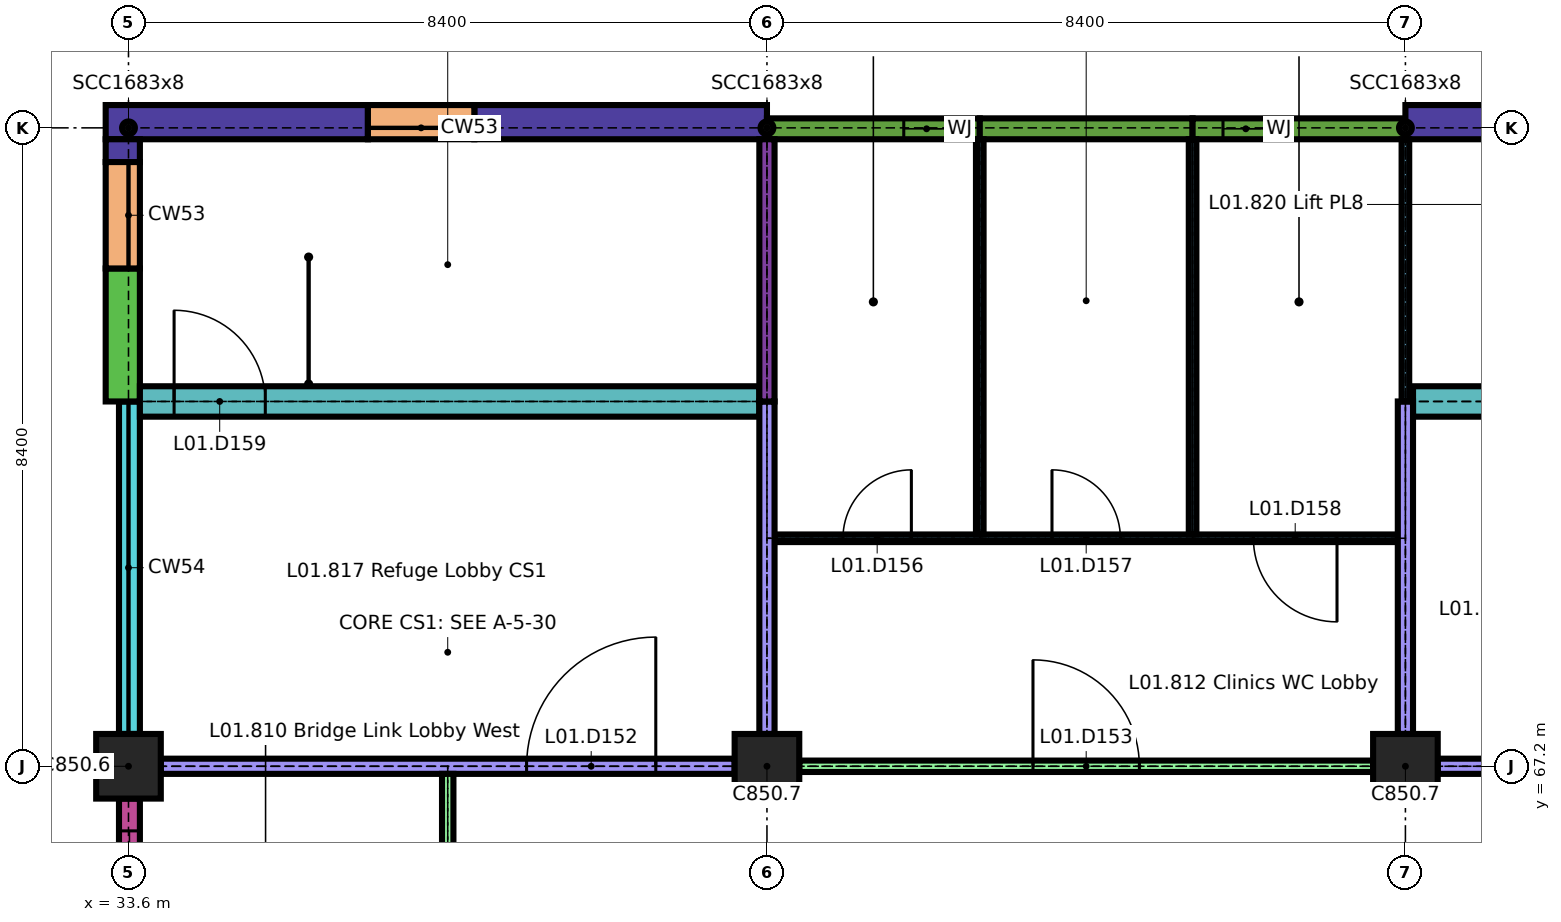
"""IFC4 building model, lengths in metres.
Left out: names, types, materials, properties, quantities, classifications, styles, units other than length and angle.
Written with IfcOpenShell. Run it as: python <this file> out.ifc"""

import sys

from ifc_helpers import new_model, si_unit, direction, frame, frame_2d, origin, origin_2d, place, context, subcontext, project, spatial, rectangle, hollow_circle, extrude, element, fill, save


model = new_model("IFC4")
c1 = context("Model", 3, precision=1e-05, world=origin(), true_north=direction((0.0, 1.0)))
c2 = subcontext(c1, "Body", "Model", "MODEL_VIEW")
j1 = project(units=[si_unit("LENGTHUNIT", "METRE"), si_unit("PLANEANGLEUNIT", "RADIAN")], contexts=[c1])
p1 = place(None, origin())
s1 = spatial("IfcSite", under=j1, at=p1, CompositionType="ELEMENT")
p2 = place(p1, origin())
s2 = spatial("IfcBuilding", under=s1, at=p2, CompositionType="ELEMENT")
p3 = place(p2, frame((0.0, 0.0, 4.5)))
s3 = spatial("IfcBuildingStorey", under=s2, at=p3, CompositionType="ELEMENT", Elevation=4.5)
for number, where, z_axis, x_axis in (
    (1, (33.6, 67.2, 0.0), (0.0, 0.0, 1.0), (1.0, 0.0, 0.0)),
    (2, (42.0, 67.2, 0.0), (0.0, 0.0, 1.0), (1.0, 0.0, 0.0)),
    (3, (50.4, 67.2, 0.0), (0.0, 0.0, 1.0), (1.0, 0.0, 0.0)),
):
    element("IfcColumn", number, at=place(p3, frame(where, z_axis=z_axis, x_axis=x_axis)), inside=s3, PredefinedType="COLUMN", context=c2, shape_type="SweptSolid", body=[
        extrude(rectangle(XDim=0.85, YDim=0.85, at=origin_2d()), origin(), (0.0, 0.0, 1.0), 3.3),
    ])
for number, where, z_axis, x_axis in (
    (4, (33.6, 75.6, 3.3), (0.0, 0.0, 1.0), (1.0, 0.0, 0.0)),
    (5, (42.0, 75.6, 3.3), (0.0, 0.0, 1.0), (1.0, 0.0, 0.0)),
    (6, (50.4, 75.6, 3.3), (0.0, 0.0, 1.0), (1.0, 0.0, 0.0)),
):
    element("IfcColumn", number, at=place(p3, frame(where, z_axis=z_axis, x_axis=x_axis)), inside=s3, PredefinedType="COLUMN", context=c2, shape_type="SweptSolid", body=[
        extrude(hollow_circle(Radius=0.084, WallThickness=0.008, at=origin_2d()), origin(), (0.0, 0.0, 1.0), 1.058),
    ])
p4 = place(p3, frame((33.3, 75.675, 0.0), z_axis=(0.0, 0.0, 1.0), x_axis=(1.0, 0.0, 0.0)))
e7 = element("IfcWall", 7, at=p4, inside=s3, PredefinedType="SOLIDWALL", context=c2, shape_type="SweptSolid", body=[
    extrude(rectangle(XDim=3.45, YDim=0.45, at=frame_2d((1.725, 0.0))), origin(), (0.0, 0.0, 1.0), 3.3),
])
p5 = place(p3, frame((38.15, 75.675, 0.0), z_axis=(0.0, 0.0, 1.0), x_axis=(1.0, 0.0, 0.0)))
e8 = element("IfcWall", 8, at=p5, inside=s3, PredefinedType="SOLIDWALL", context=c2, shape_type="SweptSolid", body=[
    extrude(rectangle(XDim=3.85, YDim=0.45, at=frame_2d((1.925, 0.0))), origin(), (0.0, 0.0, 1.0), 3.3),
])
p6 = place(p3, frame((36.75, 75.675, 0.0), z_axis=(0.0, 0.0, 1.0), x_axis=(1.0, 0.0, 0.0)))
e9 = element("IfcWall", 9, at=p6, inside=s3, PredefinedType="SOLIDWALL", context=c2, shape_type="SweptSolid", body=[
    extrude(rectangle(XDim=1.4, YDim=0.45, at=frame_2d((0.7, 0.0))), origin(), (0.0, 0.0, 1.0), 0.6),
])
p7 = place(p3, frame((42.0, 75.587, 0.0), z_axis=(0.0, 0.0, 1.0), x_axis=(1.0, 0.0, 0.0)))
e10 = element("IfcWall", 10, at=p7, inside=s3, PredefinedType="SOLIDWALL", context=c2, shape_type="SweptSolid", body=[
    extrude(rectangle(XDim=2.8, YDim=0.275, at=frame_2d((1.4, 0.0))), origin(), (0.0, 0.0, 1.0), 3.3),
])
p8 = place(p7, frame((1.8, 0.0, 1.5)))
e11 = element("IfcOpeningElement", 11, at=p8, cuts=e10, PredefinedType="OPENING", context=c2, shape_type="SweptSolid", body=[
    extrude(rectangle(XDim=0.6, YDim=0.6, at=frame_2d((0.3, 0.3))), frame((0.0, 0.147, 0.0), z_axis=(0.0, -1.0, 0.0), x_axis=(1.0, 0.0, 0.0)), (0.0, 0.0, 1.0), 0.295),
])
p9 = place(p3, frame((44.8, 75.587, 0.0), z_axis=(0.0, 0.0, 1.0), x_axis=(1.0, 0.0, 0.0)))
e12 = element("IfcWall", 12, at=p9, inside=s3, PredefinedType="SOLIDWALL", context=c2, shape_type="SweptSolid", body=[
    extrude(rectangle(XDim=2.8, YDim=0.275, at=frame_2d((1.4, 0.0))), origin(), (0.0, 0.0, 1.0), 3.3),
])
p10 = place(p3, frame((47.6, 75.587, 0.0), z_axis=(0.0, 0.0, 1.0), x_axis=(1.0, 0.0, 0.0)))
e13 = element("IfcWall", 13, at=p10, inside=s3, PredefinedType="SOLIDWALL", context=c2, shape_type="SweptSolid", body=[
    extrude(rectangle(XDim=2.8, YDim=0.275, at=frame_2d((1.4, 0.0))), origin(), (0.0, 0.0, 1.0), 3.3),
])
p11 = place(p10, frame((0.4, 0.0, 1.5)))
e14 = element("IfcOpeningElement", 14, at=p11, cuts=e13, PredefinedType="OPENING", context=c2, shape_type="SweptSolid", body=[
    extrude(rectangle(XDim=0.6, YDim=0.6, at=frame_2d((0.3, 0.3))), frame((0.0, 0.147, 0.0), z_axis=(0.0, -1.0, 0.0), x_axis=(1.0, 0.0, 0.0)), (0.0, 0.0, 1.0), 0.295),
])
p12 = place(p3, frame((50.4, 75.675, 0.0), z_axis=(0.0, 0.0, 1.0), x_axis=(1.0, 0.0, 0.0)))
e15 = element("IfcWall", 15, at=p12, inside=s3, PredefinedType="SOLIDWALL", context=c2, shape_type="SweptSolid", body=[
    extrude(rectangle(XDim=4.2, YDim=0.45, at=frame_2d((2.1, 0.0))), origin(), (0.0, 0.0, 1.0), 3.3),
])
p13 = place(p3, frame((33.613, 64.55, 0.0), z_axis=(0.0, 0.0, 1.0), x_axis=(0.0, 1.0, 0.0)))
e16 = element("IfcWall", 16, at=p13, inside=s3, PredefinedType="SOLIDWALL", context=c2, shape_type="SweptSolid", body=[
    extrude(rectangle(XDim=2.225, YDim=0.275, at=frame_2d((1.112, 0.0))), origin(), (0.0, 0.0, 1.0), 5.0),
])
p14 = place(p13, frame((0.6, 0.0, 0.9)))
e17 = element("IfcOpeningElement", 17, at=p14, cuts=e16, PredefinedType="OPENING", context=c2, shape_type="SweptSolid", body=[
    extrude(rectangle(XDim=1.2, YDim=1.5, at=frame_2d((0.6, 0.75))), frame((0.0, 0.147, 0.0), z_axis=(0.0, -1.0, 0.0), x_axis=(1.0, 0.0, 0.0)), (0.0, 0.0, 1.0), 0.295),
])
p15 = place(p3, frame((33.613, 67.625, 0.0), z_axis=(0.0, 0.0, 1.0), x_axis=(0.0, 1.0, 0.0)))
e18 = element("IfcWall", 18, at=p15, inside=s3, PredefinedType="SOLIDWALL", context=c2, shape_type="SweptSolid", body=[
    extrude(rectangle(XDim=4.375, YDim=0.275, at=frame_2d((2.188, 0.0))), origin(), (0.0, 0.0, 1.0), 0.6),
])
p16 = place(p3, frame((33.525, 72.0, 0.0), z_axis=(0.0, 0.0, 1.0), x_axis=(0.0, 1.0, 0.0)))
e19 = element("IfcWall", 19, at=p16, inside=s3, PredefinedType="SOLIDWALL", context=c2, shape_type="SweptSolid", body=[
    extrude(rectangle(XDim=1.75, YDim=0.45, at=frame_2d((0.875, 0.0))), origin(), (0.0, 0.0, 1.0), 5.0),
])
p17 = place(p3, frame((33.525, 75.15, 0.0), z_axis=(0.0, 0.0, 1.0), x_axis=(0.0, 1.0, 0.0)))
e20 = element("IfcWall", 20, at=p17, inside=s3, PredefinedType="SOLIDWALL", context=c2, shape_type="SweptSolid", body=[
    extrude(rectangle(XDim=0.3, YDim=0.45, at=frame_2d((0.15, 0.0))), origin(), (0.0, 0.0, 1.0), 3.3),
])
p18 = place(p3, frame((33.525, 73.75, 0.0), z_axis=(0.0, 0.0, 1.0), x_axis=(0.0, 1.0, 0.0)))
e21 = element("IfcWall", 21, at=p18, inside=s3, PredefinedType="SOLIDWALL", context=c2, shape_type="SweptSolid", body=[
    extrude(rectangle(XDim=1.4, YDim=0.45, at=frame_2d((0.7, 0.0))), origin(), (0.0, 0.0, 1.0), 0.6),
])
p19 = place(p3, frame((34.025, 67.2, 0.0), z_axis=(0.0, 0.0, 1.0), x_axis=(1.0, 0.0, 0.0)))
e22 = element("IfcWall", 22, at=p19, inside=s3, PredefinedType="PARTITIONING", context=c2, shape_type="SweptSolid", body=[
    extrude(rectangle(XDim=7.55, YDim=0.2, at=frame_2d((3.775, 0.0))), origin(), (0.0, 0.0, 1.0), 3.3),
])
p20 = place(p19, frame((4.812, 0.0, 0.0)))
e23 = element("IfcOpeningElement", 23, at=p20, cuts=e22, PredefinedType="OPENING", context=c2, shape_type="SweptSolid", body=[
    extrude(rectangle(XDim=1.7, YDim=2.4, at=frame_2d((0.85, 1.2))), frame((0.0, 0.11, 0.0), z_axis=(0.0, -1.0, 0.0), x_axis=(1.0, 0.0, 0.0)), (0.0, 0.0, 1.0), 0.22),
])
p21 = place(p3, frame((42.425, 67.2, 0.0), z_axis=(0.0, 0.0, 1.0), x_axis=(1.0, 0.0, 0.0)))
e24 = element("IfcWall", 24, at=p21, inside=s3, PredefinedType="PARTITIONING", context=c2, shape_type="SweptSolid", body=[
    extrude(rectangle(XDim=7.55, YDim=0.15, at=frame_2d((3.775, 0.0))), origin(), (0.0, 0.0, 1.0), 3.3),
])
p22 = place(p21, frame((3.075, 0.0, 0.0)))
e25 = element("IfcOpeningElement", 25, at=p22, cuts=e24, PredefinedType="OPENING", context=c2, shape_type="SweptSolid", body=[
    extrude(rectangle(XDim=1.4, YDim=2.1, at=frame_2d((0.7, 1.05))), frame((0.0, 0.085, 0.0), z_axis=(0.0, -1.0, 0.0), x_axis=(1.0, 0.0, 0.0)), (0.0, 0.0, 1.0), 0.17),
])
p23 = place(p3, frame((50.825, 67.2, 0.0), z_axis=(0.0, 0.0, 1.0), x_axis=(1.0, 0.0, 0.0)))
e26 = element("IfcWall", 26, at=p23, inside=s3, PredefinedType="PARTITIONING", context=c2, shape_type="SweptSolid", body=[
    extrude(rectangle(XDim=7.55, YDim=0.2, at=frame_2d((3.775, 0.0))), origin(), (0.0, 0.0, 1.0), 3.3),
])
p24 = place(p23, frame((2.925, 0.0, 0.0)))
e27 = element("IfcOpeningElement", 27, at=p24, cuts=e26, PredefinedType="OPENING", context=c2, shape_type="SweptSolid", body=[
    extrude(rectangle(XDim=1.7, YDim=2.4, at=frame_2d((0.85, 1.2))), frame((0.0, 0.11, 0.0), z_axis=(0.0, -1.0, 0.0), x_axis=(1.0, 0.0, 0.0)), (0.0, 0.0, 1.0), 0.22),
])
p25 = place(p3, frame((42.1, 70.2, 0.0), z_axis=(0.0, 0.0, 1.0), x_axis=(1.0, 0.0, 0.0)))
e28 = element("IfcWall", 28, at=p25, inside=s3, PredefinedType="PARTITIONING", context=c2, shape_type="SweptSolid", body=[
    extrude(rectangle(XDim=8.2, YDim=0.1, at=frame_2d((4.1, 0.0))), origin(), (0.0, 0.0, 1.0), 3.3),
])
p26 = place(p25, frame((0.9, 0.0, 0.0)))
e29 = element("IfcOpeningElement", 29, at=p26, cuts=e28, PredefinedType="OPENING", context=c2, shape_type="SweptSolid", body=[
    extrude(rectangle(XDim=0.9, YDim=2.1, at=frame_2d((0.45, 1.05))), frame((0.0, 0.06, 0.0), z_axis=(0.0, -1.0, 0.0), x_axis=(1.0, 0.0, 0.0)), (0.0, 0.0, 1.0), 0.12),
])
p27 = place(p25, frame((3.65, 0.0, 0.0)))
e30 = element("IfcOpeningElement", 30, at=p27, cuts=e28, PredefinedType="OPENING", context=c2, shape_type="SweptSolid", body=[
    extrude(rectangle(XDim=0.9, YDim=2.1, at=frame_2d((0.45, 1.05))), frame((0.0, 0.06, 0.0), z_axis=(0.0, -1.0, 0.0), x_axis=(1.0, 0.0, 0.0)), (0.0, 0.0, 1.0), 0.12),
])
p28 = place(p25, frame((6.3, 0.0, 0.0)))
e31 = element("IfcOpeningElement", 31, at=p28, cuts=e28, PredefinedType="OPENING", context=c2, shape_type="SweptSolid", body=[
    extrude(rectangle(XDim=1.1, YDim=2.1, at=frame_2d((0.55, 1.05))), frame((0.0, 0.06, 0.0), z_axis=(0.0, -1.0, 0.0), x_axis=(1.0, 0.0, 0.0)), (0.0, 0.0, 1.0), 0.12),
])
p29 = place(p3, frame((33.75, 72.0, 0.0), z_axis=(0.0, 0.0, 1.0), x_axis=(1.0, 0.0, 0.0)))
e32 = element("IfcWall", 32, at=p29, inside=s3, PredefinedType="SHEAR", context=c2, shape_type="SweptSolid", body=[
    extrude(rectangle(XDim=8.15, YDim=0.4, at=frame_2d((4.075, 0.0))), origin(), (0.0, 0.0, 1.0), 3.3),
])
p30 = place(p29, frame((0.45, 0.0, 0.0)))
e33 = element("IfcOpeningElement", 33, at=p30, cuts=e32, PredefinedType="OPENING", context=c2, shape_type="SweptSolid", body=[
    extrude(rectangle(XDim=1.2, YDim=2.1, at=frame_2d((0.6, 1.05))), frame((0.0, 0.21, 0.0), z_axis=(0.0, -1.0, 0.0), x_axis=(1.0, 0.0, 0.0)), (0.0, 0.0, 1.0), 0.42),
])
p31 = place(p3, frame((50.5, 72.0, 0.0), z_axis=(0.0, 0.0, 1.0), x_axis=(1.0, 0.0, 0.0)))
e34 = element("IfcWall", 34, at=p31, inside=s3, PredefinedType="SHEAR", context=c2, shape_type="SweptSolid", body=[
    extrude(rectangle(XDim=4.1, YDim=0.4, at=frame_2d((2.05, 0.0))), origin(), (0.0, 0.0, 1.0), 3.3),
])
p32 = place(p31, frame((1.5, 0.0, 0.0)))
e35 = element("IfcOpeningElement", 35, at=p32, cuts=e34, PredefinedType="OPENING", context=c2, shape_type="SweptSolid", body=[
    extrude(rectangle(XDim=1.1, YDim=2.1, at=frame_2d((0.55, 1.05))), frame((0.0, 0.21, 0.0), z_axis=(0.0, -1.0, 0.0), x_axis=(1.0, 0.0, 0.0)), (0.0, 0.0, 1.0), 0.42),
])
p33 = place(p3, frame((37.8, 60.075, 0.0), z_axis=(0.0, 0.0, 1.0), x_axis=(0.0, 1.0, 0.0)))
e36 = element("IfcWall", 36, at=p33, inside=s3, PredefinedType="PARTITIONING", context=c2, shape_type="SweptSolid", body=[
    extrude(rectangle(XDim=7.025, YDim=0.15, at=frame_2d((3.513, 0.0))), origin(), (0.0, 0.0, 1.0), 3.3),
])
p34 = place(p33, frame((2.613, 0.0, 0.0)))
e37 = element("IfcOpeningElement", 37, at=p34, cuts=e36, PredefinedType="OPENING", context=c2, shape_type="SweptSolid", body=[
    extrude(rectangle(XDim=1.8, YDim=2.4, at=frame_2d((0.9, 1.2))), frame((0.0, 0.085, 0.0), z_axis=(0.0, -1.0, 0.0), x_axis=(1.0, 0.0, 0.0)), (0.0, 0.0, 1.0), 0.17),
])
p35 = place(p3, frame((42.0, 67.625, 0.0), z_axis=(0.0, 0.0, 1.0), x_axis=(0.0, 1.0, 0.0)))
e38 = element("IfcWall", 38, at=p35, inside=s3, PredefinedType="PARTITIONING", context=c2, shape_type="SweptSolid", body=[
    extrude(rectangle(XDim=4.375, YDim=0.2, at=frame_2d((2.188, 0.0))), origin(), (0.0, 0.0, 1.0), 3.3),
])
p36 = place(p3, frame((42.0, 72.0, 0.0), z_axis=(0.0, 0.0, 1.0), x_axis=(0.0, 1.0, 0.0)))
e39 = element("IfcWall", 39, at=p36, inside=s3, PredefinedType="PARTITIONING", context=c2, shape_type="SweptSolid", body=[
    extrude(rectangle(XDim=3.45, YDim=0.2, at=frame_2d((1.725, 0.0))), origin(), (0.0, 0.0, 1.0), 3.3),
])
for number, where, z_axis, x_axis in (
    (40, (44.8, 70.25, 0.0), (0.0, 0.0, 1.0), (0.0, 1.0, 0.0)),
    (41, (47.6, 70.25, 0.0), (0.0, 0.0, 1.0), (0.0, 1.0, 0.0)),
):
    element("IfcWall", number, at=place(p3, frame(where, z_axis=z_axis, x_axis=x_axis)), inside=s3, PredefinedType="PARTITIONING", context=c2, shape_type="SweptSolid", body=[
        extrude(rectangle(XDim=5.2, YDim=0.1, at=frame_2d((2.6, 0.0))), origin(), (0.0, 0.0, 1.0), 3.3),
    ])
p37 = place(p3, frame((50.4, 67.625, 0.0), z_axis=(0.0, 0.0, 1.0), x_axis=(0.0, 1.0, 0.0)))
e42 = element("IfcWall", 42, at=p37, inside=s3, PredefinedType="PARTITIONING", context=c2, shape_type="SweptSolid", body=[
    extrude(rectangle(XDim=4.375, YDim=0.2, at=frame_2d((2.188, 0.0))), origin(), (0.0, 0.0, 1.0), 3.3),
])
p38 = place(p3, frame((50.4, 72.0, 0.0), z_axis=(0.0, 0.0, 1.0), x_axis=(0.0, 1.0, 0.0)))
e43 = element("IfcWall", 43, at=p38, inside=s3, PredefinedType="PARTITIONING", context=c2, shape_type="SweptSolid", body=[
    extrude(rectangle(XDim=3.45, YDim=0.1, at=frame_2d((1.725, 0.0))), origin(), (0.0, 0.0, 1.0), 3.3),
])
p39 = place(p8, origin())
e44 = element("IfcWindow", 44, at=p39, inside=s3, PartitioningType="SINGLE_PANEL", PredefinedType="WINDOW", context=c2, shape_type="SweptSolid", body=[
    extrude(rectangle(XDim=0.6, YDim=0.6, at=frame_2d((0.3, 0.3))), frame((0.0, 0.03, 0.0), z_axis=(0.0, -1.0, 0.0), x_axis=(1.0, 0.0, 0.0)), (0.0, 0.0, 1.0), 0.06),
])
fill(e11, e44)
p40 = place(p11, origin())
e45 = element("IfcWindow", 45, at=p40, inside=s3, PartitioningType="SINGLE_PANEL", PredefinedType="WINDOW", context=c2, shape_type="SweptSolid", body=[
    extrude(rectangle(XDim=0.6, YDim=0.6, at=frame_2d((0.3, 0.3))), frame((0.0, 0.03, 0.0), z_axis=(0.0, -1.0, 0.0), x_axis=(1.0, 0.0, 0.0)), (0.0, 0.0, 1.0), 0.06),
])
fill(e14, e45)
p41 = place(p14, origin())
e46 = element("IfcWindow", 46, at=p41, inside=s3, PartitioningType="SINGLE_PANEL", PredefinedType="WINDOW", context=c2, shape_type="SweptSolid", body=[
    extrude(rectangle(XDim=1.2, YDim=1.5, at=frame_2d((0.6, 0.75))), frame((0.0, 0.03, 0.0), z_axis=(0.0, -1.0, 0.0), x_axis=(1.0, 0.0, 0.0)), (0.0, 0.0, 1.0), 0.06),
])
fill(e17, e46)
p42 = place(p20, origin())
e47 = element("IfcDoor", 47, at=p42, inside=s3, OperationType="SINGLE_SWING_LEFT", PredefinedType="DOOR", context=c2, shape_type="SweptSolid", body=[
    extrude(rectangle(XDim=1.7, YDim=2.4, at=frame_2d((0.85, 1.2))), frame((0.0, 0.025, 0.0), z_axis=(0.0, -1.0, 0.0), x_axis=(1.0, 0.0, 0.0)), (0.0, 0.0, 1.0), 0.05),
])
fill(e23, e47)
p43 = place(p22, origin())
e48 = element("IfcDoor", 48, at=p43, inside=s3, OperationType="SINGLE_SWING_RIGHT", PredefinedType="DOOR", context=c2, shape_type="SweptSolid", body=[
    extrude(rectangle(XDim=1.4, YDim=2.1, at=frame_2d((0.7, 1.05))), frame((0.0, 0.025, 0.0), z_axis=(0.0, -1.0, 0.0), x_axis=(1.0, 0.0, 0.0)), (0.0, 0.0, 1.0), 0.05),
])
fill(e25, e48)
p44 = place(p26, origin())
e49 = element("IfcDoor", 49, at=p44, inside=s3, OperationType="SINGLE_SWING_LEFT", PredefinedType="DOOR", context=c2, shape_type="SweptSolid", body=[
    extrude(rectangle(XDim=0.9, YDim=2.1, at=frame_2d((0.45, 1.05))), frame((0.0, 0.02, 0.0), z_axis=(0.0, -1.0, 0.0), x_axis=(1.0, 0.0, 0.0)), (0.0, 0.0, 1.0), 0.04),
])
fill(e29, e49)
p45 = place(p27, origin())
e50 = element("IfcDoor", 50, at=p45, inside=s3, OperationType="SINGLE_SWING_RIGHT", PredefinedType="DOOR", context=c2, shape_type="SweptSolid", body=[
    extrude(rectangle(XDim=0.9, YDim=2.1, at=frame_2d((0.45, 1.05))), frame((0.0, 0.02, 0.0), z_axis=(0.0, -1.0, 0.0), x_axis=(1.0, 0.0, 0.0)), (0.0, 0.0, 1.0), 0.04),
])
fill(e30, e50)
p46 = place(p28, origin())
e51 = element("IfcDoor", 51, at=p46, inside=s3, OperationType="SINGLE_SWING_RIGHT", PredefinedType="DOOR", context=c2, shape_type="SweptSolid", body=[
    extrude(rectangle(XDim=1.1, YDim=2.1, at=frame_2d((0.55, 1.05))), frame((0.0, 0.025, 0.0), z_axis=(0.0, -1.0, 0.0), x_axis=(1.0, 0.0, 0.0)), (0.0, 0.0, 1.0), 0.05),
])
fill(e31, e51)
p47 = place(p30, origin())
e52 = element("IfcDoor", 52, at=p47, inside=s3, OperationType="SINGLE_SWING_RIGHT", PredefinedType="DOOR", context=c2, shape_type="SweptSolid", body=[
    extrude(rectangle(XDim=1.2, YDim=2.1, at=frame_2d((0.6, 1.05))), frame((0.0, 0.025, 0.0), z_axis=(0.0, -1.0, 0.0), x_axis=(1.0, 0.0, 0.0)), (0.0, 0.0, 1.0), 0.05),
])
fill(e33, e52)
save(model, sys.argv[1])
